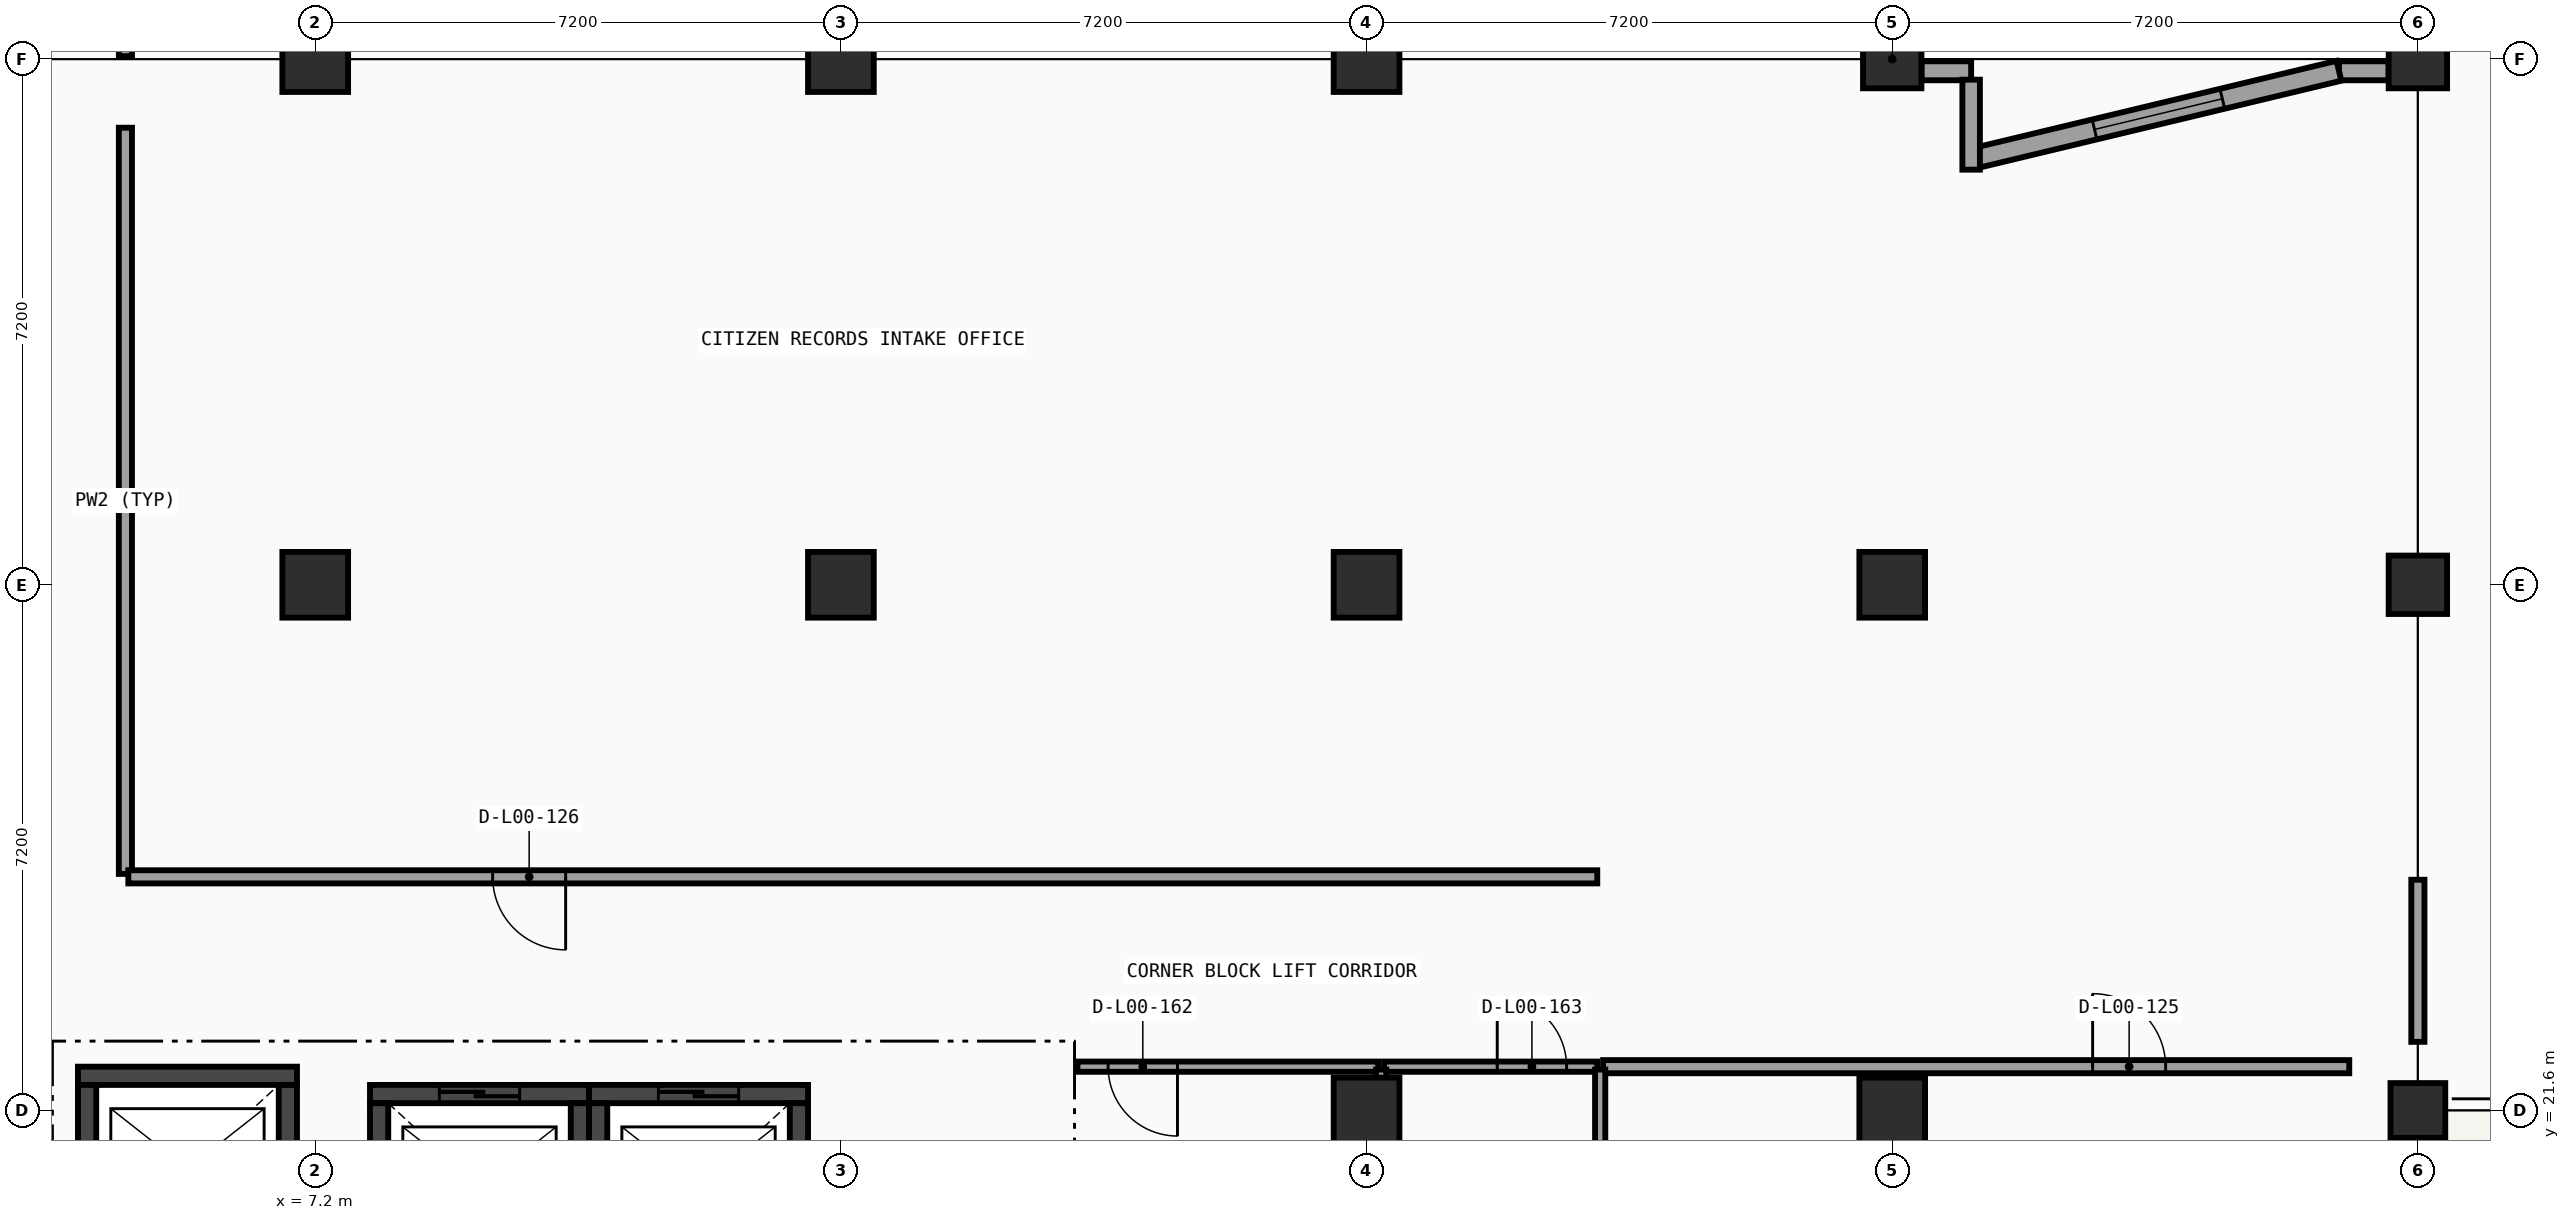
"""IFC4 building model, lengths in metres.
Left out: names, types, materials, properties, quantities, classifications, styles, units other than length and angle.
Written with IfcOpenShell. Run it as: python <this file> out.ifc"""

import sys

from ifc_helpers import new_model, si_unit, direction, frame, frame_2d, origin, origin_2d, place, context, subcontext, project, spatial, rectangle, extrude, element, fill, save


model = new_model("IFC4")
c1 = context("Model", 3, precision=1e-05, world=origin(), true_north=direction((0.0, 1.0)))
c2 = subcontext(c1, "Body", "Model", "MODEL_VIEW")
j1 = project(units=[si_unit("LENGTHUNIT", "METRE"), si_unit("PLANEANGLEUNIT", "RADIAN")], contexts=[c1])
p1 = place(None, origin())
s1 = spatial("IfcSite", under=j1, at=p1, CompositionType="ELEMENT")
p2 = place(p1, origin())
s2 = spatial("IfcBuilding", under=s1, at=p2, CompositionType="ELEMENT")
p3 = place(p2, origin())
s3 = spatial("IfcBuildingStorey", under=s2, at=p3, CompositionType="ELEMENT", Elevation=0.0)
for number, where, z_axis, x_axis in (
    (1, (7.2, 28.8, 0.0), (0.0, 0.0, 1.0), (1.0, 0.0, 0.0)),
    (2, (7.2, 36.0, 0.0), (0.0, 0.0, 1.0), (1.0, 0.0, 0.0)),
    (3, (14.4, 28.8, 0.0), (0.0, 0.0, 1.0), (1.0, 0.0, 0.0)),
    (4, (14.4, 36.0, 0.0), (0.0, 0.0, 1.0), (1.0, 0.0, 0.0)),
    (5, (21.6, 21.6, 0.0), (0.0, 0.0, 1.0), (1.0, 0.0, 0.0)),
    (6, (21.6, 28.8, 0.0), (0.0, 0.0, 1.0), (1.0, 0.0, 0.0)),
    (7, (21.6, 36.0, 0.0), (0.0, 0.0, 1.0), (1.0, 0.0, 0.0)),
    (8, (28.8, 21.6, 0.0), (0.0, 0.0, 1.0), (1.0, 0.0, 0.0)),
    (9, (28.8, 28.8, 0.0), (0.0, 0.0, 1.0), (1.0, 0.0, 0.0)),
):
    element("IfcColumn", number, at=place(p3, frame(where, z_axis=z_axis, x_axis=x_axis)), inside=s3, PredefinedType="COLUMN", context=c2, shape_type="SweptSolid", body=[
        extrude(rectangle(XDim=0.9, YDim=0.9, at=origin_2d()), origin(), (0.0, 0.0, 1.0), 5.4),
    ])
p4 = place(p3, frame((28.8, 36.0, 0.0), z_axis=(0.0, 0.0, 1.0), x_axis=(1.0, 0.0, 0.0)))
e10 = element("IfcColumn", 10, at=p4, inside=s3, PredefinedType="COLUMN", context=c2, shape_type="SweptSolid", body=[
    extrude(rectangle(XDim=0.8, YDim=0.8, at=origin_2d()), origin(), (0.0, 0.0, 1.0), 5.4),
])
p5 = place(p3, frame((36.0, 21.6, 0.0), z_axis=(0.0, 0.0, 1.0), x_axis=(1.0, 0.0, 0.0)))
e11 = element("IfcColumn", 11, at=p5, inside=s3, PredefinedType="COLUMN", context=c2, shape_type="SweptSolid", body=[
    extrude(rectangle(XDim=0.75, YDim=0.75, at=origin_2d()), origin(), (0.0, 0.0, 1.0), 5.4),
])
for number, where, z_axis, x_axis in (
    (12, (36.0, 28.8, 0.0), (0.0, 0.0, 1.0), (1.0, 0.0, 0.0)),
    (13, (36.0, 36.0, 0.0), (0.0, 0.0, 1.0), (1.0, 0.0, 0.0)),
):
    element("IfcColumn", number, at=place(p3, frame(where, z_axis=z_axis, x_axis=x_axis)), inside=s3, PredefinedType="COLUMN", context=c2, shape_type="SweptSolid", body=[
        extrude(rectangle(XDim=0.8, YDim=0.8, at=origin_2d()), origin(), (0.0, 0.0, 1.0), 5.4),
    ])
p6 = place(p3, frame((35.84, 21.224, 0.0), z_axis=(0.0, 0.0, 1.0), x_axis=(0.0, -1.0, 0.0)))
e14 = element("IfcWall", 14, at=p6, inside=s3, PredefinedType="SOLIDWALL", context=c2, shape_type="SweptSolid", body=[
    extrude(rectangle(XDim=0.68, YDim=0.26, at=frame_2d((0.34, 0.0))), origin(), (0.0, 0.0, 1.0), 4.461),
])
for number, where, z_axis, x_axis in (
    (15, (29.201, 35.84, 0.0), (0.0, 0.0, 1.0), (1.0, 0.0, 0.0)),
    (16, (34.919, 35.84, 0.0), (0.0, 0.0, 1.0), (1.0, 0.0, 0.0)),
):
    element("IfcWall", number, at=place(p3, frame(where, z_axis=z_axis, x_axis=x_axis)), inside=s3, PredefinedType="SOLIDWALL", context=c2, shape_type="SweptSolid", body=[
        extrude(rectangle(XDim=0.68, YDim=0.26, at=frame_2d((0.34, 0.0))), origin(), (0.0, 0.0, 1.0), 4.411),
    ])
p7 = place(p3, frame((29.973, 34.653, 0.0), z_axis=(0.0, 0.0, 1.0), x_axis=(0.972362024801, 0.233478248933, 0.0)))
e17 = element("IfcWall", 17, at=p7, inside=s3, PredefinedType="SOLIDWALL", context=c2, shape_type="SweptSolid", body=[
    extrude(rectangle(XDim=5.086, YDim=0.28, at=frame_2d((2.543, 0.0))), origin(), (0.0, 0.0, 1.0), 4.411),
])
p8 = place(p7, frame((1.643, 0.0, 0.8)))
e18 = element("IfcOpeningElement", 18, at=p8, cuts=e17, PredefinedType="OPENING", context=c2, shape_type="SweptSolid", body=[
    extrude(rectangle(XDim=1.8, YDim=1.85, at=frame_2d((0.9, 0.925))), frame((0.0, 0.15, 0.0), z_axis=(0.0, -1.0, 0.0), x_axis=(1.0, 0.0, 0.0)), (0.0, 0.0, 1.0), 0.3),
])
p9 = place(p3, frame((29.881, 34.486, 0.0), z_axis=(0.0, 0.0, 1.0), x_axis=(0.0, 1.0, 0.0)))
e19 = element("IfcWall", 19, at=p9, inside=s3, PredefinedType="SOLIDWALL", context=c2, shape_type="SweptSolid", body=[
    extrude(rectangle(XDim=1.232, YDim=0.24, at=frame_2d((0.616, 0.0))), origin(), (0.0, 0.0, 1.0), 5.12),
])
p10 = place(p3, frame((6.95, 22.075, 0.0), z_axis=(0.0, 0.0, 1.0), x_axis=(-1.0, 0.0, 0.0)))
e20 = element("IfcWall", 20, at=p10, inside=s3, PredefinedType="SHEAR", context=c2, shape_type="SweptSolid", body=[
    extrude(rectangle(XDim=3.0, YDim=0.25, at=frame_2d((1.5, 0.0))), origin(), (0.0, 0.0, 1.0), 5.12),
])
for number, where, z_axis, x_axis in (
    (21, (4.075, 21.95, 0.0), (0.0, 0.0, 1.0), (0.0, -1.0, 0.0)),
    (22, (6.825, 19.65, 0.0), (0.0, 0.0, 1.0), (0.0, 1.0, 0.0)),
):
    element("IfcWall", number, at=place(p3, frame(where, z_axis=z_axis, x_axis=x_axis)), inside=s3, PredefinedType="SHEAR", context=c2, shape_type="SweptSolid", body=[
        extrude(rectangle(XDim=2.3, YDim=0.25, at=frame_2d((1.15, 0.0))), origin(), (0.0, 0.0, 1.0), 5.12),
    ])
p11 = place(p3, frame((10.95, 21.825, 0.0), z_axis=(0.0, 0.0, 1.0), x_axis=(-1.0, 0.0, 0.0)))
e23 = element("IfcWall", 23, at=p11, inside=s3, PredefinedType="SHEAR", context=c2, shape_type="SweptSolid", body=[
    extrude(rectangle(XDim=3.0, YDim=0.25, at=frame_2d((1.5, 0.0))), origin(), (0.0, 0.0, 1.0), 5.12),
])
p12 = place(p11, frame((0.95, 0.0, 0.0)))
e24 = element("IfcOpeningElement", 24, at=p12, cuts=e23, PredefinedType="OPENING", context=c2, shape_type="SweptSolid", body=[
    extrude(rectangle(XDim=1.1, YDim=2.1, at=frame_2d((0.55, 1.05))), frame((0.0, 0.135, 0.0), z_axis=(0.0, -1.0, 0.0), x_axis=(1.0, 0.0, 0.0)), (0.0, 0.0, 1.0), 0.27),
])
for number, where, z_axis, x_axis in (
    (25, (8.075, 21.7, 0.0), (0.0, 0.0, 1.0), (0.0, -1.0, 0.0)),
    (26, (10.825, 19.4, 0.0), (0.0, 0.0, 1.0), (0.0, 1.0, 0.0)),
):
    element("IfcWall", number, at=place(p3, frame(where, z_axis=z_axis, x_axis=x_axis)), inside=s3, PredefinedType="SHEAR", context=c2, shape_type="SweptSolid", body=[
        extrude(rectangle(XDim=2.3, YDim=0.25, at=frame_2d((1.15, 0.0))), origin(), (0.0, 0.0, 1.0), 5.12),
    ])
p13 = place(p3, frame((13.95, 21.825, 0.0), z_axis=(0.0, 0.0, 1.0), x_axis=(-1.0, 0.0, 0.0)))
e27 = element("IfcWall", 27, at=p13, inside=s3, PredefinedType="SHEAR", context=c2, shape_type="SweptSolid", body=[
    extrude(rectangle(XDim=3.0, YDim=0.25, at=frame_2d((1.5, 0.0))), origin(), (0.0, 0.0, 1.0), 5.12),
])
p14 = place(p13, frame((0.95, 0.0, 0.0)))
e28 = element("IfcOpeningElement", 28, at=p14, cuts=e27, PredefinedType="OPENING", context=c2, shape_type="SweptSolid", body=[
    extrude(rectangle(XDim=1.1, YDim=2.1, at=frame_2d((0.55, 1.05))), frame((0.0, 0.135, 0.0), z_axis=(0.0, -1.0, 0.0), x_axis=(1.0, 0.0, 0.0)), (0.0, 0.0, 1.0), 0.27),
])
for number, where, z_axis, x_axis in (
    (29, (11.075, 21.7, 0.0), (0.0, 0.0, 1.0), (0.0, -1.0, 0.0)),
    (30, (13.825, 19.4, 0.0), (0.0, 0.0, 1.0), (0.0, 1.0, 0.0)),
):
    element("IfcWall", number, at=place(p3, frame(where, z_axis=z_axis, x_axis=x_axis)), inside=s3, PredefinedType="SHEAR", context=c2, shape_type="SweptSolid", body=[
        extrude(rectangle(XDim=2.3, YDim=0.25, at=frame_2d((1.15, 0.0))), origin(), (0.0, 0.0, 1.0), 5.12),
    ])
p15 = place(p3, frame((4.6, 24.84, 0.0), z_axis=(0.0, 0.0, 1.0), x_axis=(0.0, 1.0, 0.0)))
e31 = element("IfcWall", 31, at=p15, inside=s3, PredefinedType="PARTITIONING", context=c2, shape_type="SweptSolid", body=[
    extrude(rectangle(XDim=10.22, YDim=0.18, at=frame_2d((5.11, 0.0))), origin(), (0.0, 0.0, 1.0), 4.45),
])
p16 = place(p3, frame((4.6, 36.04, 0.0), z_axis=(0.0, 0.0, 1.0), x_axis=(0.0, 1.0, 0.0)))
e32 = element("IfcWall", 32, at=p16, inside=s3, PredefinedType="PARTITIONING", context=c2, shape_type="SweptSolid", body=[
    extrude(rectangle(XDim=14.32, YDim=0.18, at=frame_2d((7.16, 0.0))), origin(), (0.0, 0.0, 1.0), 4.45),
])
p17 = place(p16, frame((3.54, 0.0, 0.0)))
e33 = element("IfcOpeningElement", 33, at=p17, cuts=e32, PredefinedType="OPENING", context=c2, shape_type="SweptSolid", body=[
    extrude(rectangle(XDim=1.0, YDim=2.1, at=frame_2d((0.5, 1.05))), frame((0.0, 0.1, 0.0), z_axis=(0.0, -1.0, 0.0), x_axis=(1.0, 0.0, 0.0)), (0.0, 0.0, 1.0), 0.2),
])
p18 = place(p3, frame((24.84, 22.2, 0.0), z_axis=(0.0, 0.0, 1.0), x_axis=(1.0, 0.0, 0.0)))
e34 = element("IfcWall", 34, at=p18, inside=s3, PredefinedType="PARTITIONING", context=c2, shape_type="SweptSolid", body=[
    extrude(rectangle(XDim=10.22, YDim=0.18, at=frame_2d((5.11, 0.0))), origin(), (0.0, 0.0, 1.0), 4.311),
])
p19 = place(p18, frame((6.705, 0.0, 0.0)))
e35 = element("IfcOpeningElement", 35, at=p19, cuts=e34, PredefinedType="OPENING", context=c2, shape_type="SweptSolid", body=[
    extrude(rectangle(XDim=1.0, YDim=2.1, at=frame_2d((0.5, 1.05))), frame((0.0, 0.1, 0.0), z_axis=(0.0, -1.0, 0.0), x_axis=(1.0, 0.0, 0.0)), (0.0, 0.0, 1.0), 0.2),
])
p20 = place(p3, frame((4.64, 24.8, 0.0), z_axis=(0.0, 0.0, 1.0), x_axis=(1.0, 0.0, 0.0)))
e36 = element("IfcWall", 36, at=p20, inside=s3, PredefinedType="PARTITIONING", context=c2, shape_type="SweptSolid", body=[
    extrude(rectangle(XDim=20.12, YDim=0.18, at=frame_2d((10.06, 0.0))), origin(), (0.0, 0.0, 1.0), 4.311),
])
p21 = place(p20, frame((4.99, 0.0, 0.0)))
e37 = element("IfcOpeningElement", 37, at=p21, cuts=e36, PredefinedType="OPENING", context=c2, shape_type="SweptSolid", body=[
    extrude(rectangle(XDim=1.0, YDim=2.1, at=frame_2d((0.5, 1.05))), frame((0.0, 0.1, 0.0), z_axis=(0.0, -1.0, 0.0), x_axis=(1.0, 0.0, 0.0)), (0.0, 0.0, 1.0), 0.2),
])
p22 = place(p3, frame((36.0, 22.54, 0.0), z_axis=(0.0, 0.0, 1.0), x_axis=(0.0, 1.0, 0.0)))
e38 = element("IfcWall", 38, at=p22, inside=s3, PredefinedType="PARTITIONING", context=c2, shape_type="SweptSolid", body=[
    extrude(rectangle(XDim=2.22, YDim=0.18, at=frame_2d((1.11, 0.0))), origin(), (0.0, 0.0, 1.0), 4.461),
])
p23 = place(p3, frame((17.64, 22.2, 0.0), z_axis=(0.0, 0.0, 1.0), x_axis=(1.0, 0.0, 0.0)))
e39 = element("IfcWall", 39, at=p23, inside=s3, PredefinedType="PARTITIONING", context=c2, shape_type="SweptSolid", body=[
    extrude(rectangle(XDim=4.12, YDim=0.14, at=frame_2d((2.06, 0.0))), origin(), (0.0, 0.0, 1.0), 4.311),
])
p24 = place(p23, frame((0.42, 0.0, 0.0)))
e40 = element("IfcOpeningElement", 40, at=p24, cuts=e39, PredefinedType="OPENING", context=c2, shape_type="SweptSolid", body=[
    extrude(rectangle(XDim=0.95, YDim=2.08, at=frame_2d((0.475, 1.04))), frame((0.0, 0.08, 0.0), z_axis=(0.0, -1.0, 0.0), x_axis=(1.0, 0.0, 0.0)), (0.0, 0.0, 1.0), 0.16),
])
p25 = place(p3, frame((21.84, 22.2, 0.0), z_axis=(0.0, 0.0, 1.0), x_axis=(1.0, 0.0, 0.0)))
e41 = element("IfcWall", 41, at=p25, inside=s3, PredefinedType="PARTITIONING", context=c2, shape_type="SweptSolid", body=[
    extrude(rectangle(XDim=2.92, YDim=0.14, at=frame_2d((1.46, 0.0))), origin(), (0.0, 0.0, 1.0), 4.311),
])
p26 = place(p25, frame((1.55, 0.0, 0.0)))
e42 = element("IfcOpeningElement", 42, at=p26, cuts=e41, PredefinedType="OPENING", context=c2, shape_type="SweptSolid", body=[
    extrude(rectangle(XDim=0.95, YDim=2.08, at=frame_2d((0.475, 1.04))), frame((0.0, 0.08, 0.0), z_axis=(0.0, -1.0, 0.0), x_axis=(1.0, 0.0, 0.0)), (0.0, 0.0, 1.0), 0.16),
])
p27 = place(p3, frame((24.8, 15.04, 0.0), z_axis=(0.0, 0.0, 1.0), x_axis=(0.0, 1.0, 0.0)))
e43 = element("IfcWall", 43, at=p27, inside=s3, PredefinedType="PARTITIONING", context=c2, shape_type="SweptSolid", body=[
    extrude(rectangle(XDim=7.12, YDim=0.14, at=frame_2d((3.56, 0.0))), origin(), (0.0, 0.0, 1.0), 4.45),
])
p28 = place(p3, frame((21.8, 18.44, 0.0), z_axis=(0.0, 0.0, 1.0), x_axis=(0.0, 1.0, 0.0)))
e44 = element("IfcWall", 44, at=p28, inside=s3, PredefinedType="PARTITIONING", context=c2, shape_type="SweptSolid", body=[
    extrude(rectangle(XDim=3.72, YDim=0.14, at=frame_2d((1.86, 0.0))), origin(), (0.0, 0.0, 1.0), 4.311),
])
p29 = place(p8, origin())
e45 = element("IfcWindow", 45, at=p29, inside=s3, PartitioningType="SINGLE_PANEL", PredefinedType="WINDOW", context=c2, shape_type="SweptSolid", body=[
    extrude(rectangle(XDim=1.8, YDim=1.85, at=frame_2d((0.9, 0.925))), frame((0.0, 0.03, 0.0), z_axis=(0.0, -1.0, 0.0), x_axis=(1.0, 0.0, 0.0)), (0.0, 0.0, 1.0), 0.06),
])
fill(e18, e45)
p30 = place(p12, origin())
e46 = element("IfcDoor", 46, at=p30, inside=s3, OperationType="SLIDING_TO_LEFT", PredefinedType="DOOR", context=c2, shape_type="SweptSolid", body=[
    extrude(rectangle(XDim=1.1, YDim=2.1, at=frame_2d((0.55, 1.05))), frame((0.0, 0.025, 0.0), z_axis=(0.0, -1.0, 0.0), x_axis=(1.0, 0.0, 0.0)), (0.0, 0.0, 1.0), 0.05),
])
fill(e24, e46)
p31 = place(p14, origin())
e47 = element("IfcDoor", 47, at=p31, inside=s3, OperationType="SLIDING_TO_LEFT", PredefinedType="DOOR", context=c2, shape_type="SweptSolid", body=[
    extrude(rectangle(XDim=1.1, YDim=2.1, at=frame_2d((0.55, 1.05))), frame((0.0, 0.025, 0.0), z_axis=(0.0, -1.0, 0.0), x_axis=(1.0, 0.0, 0.0)), (0.0, 0.0, 1.0), 0.05),
])
fill(e28, e47)
p32 = place(p19, origin())
e48 = element("IfcDoor", 48, at=p32, inside=s3, OperationType="SINGLE_SWING_LEFT", PredefinedType="DOOR", context=c2, shape_type="SweptSolid", body=[
    extrude(rectangle(XDim=1.0, YDim=2.1, at=frame_2d((0.5, 1.05))), frame((0.0, 0.025, 0.0), z_axis=(0.0, -1.0, 0.0), x_axis=(1.0, 0.0, 0.0)), (0.0, 0.0, 1.0), 0.05),
])
fill(e35, e48)
p33 = place(p21, origin())
e49 = element("IfcDoor", 49, at=p33, inside=s3, OperationType="SINGLE_SWING_RIGHT", PredefinedType="DOOR", context=c2, shape_type="SweptSolid", body=[
    extrude(rectangle(XDim=1.0, YDim=2.1, at=frame_2d((0.5, 1.05))), frame((0.0, 0.025, 0.0), z_axis=(0.0, -1.0, 0.0), x_axis=(1.0, 0.0, 0.0)), (0.0, 0.0, 1.0), 0.05),
])
fill(e37, e49)
p34 = place(p24, origin())
e50 = element("IfcDoor", 50, at=p34, inside=s3, OperationType="SINGLE_SWING_RIGHT", PredefinedType="DOOR", context=c2, shape_type="SweptSolid", body=[
    extrude(rectangle(XDim=0.95, YDim=2.08, at=frame_2d((0.475, 1.04))), frame((0.0, 0.025, 0.0), z_axis=(0.0, -1.0, 0.0), x_axis=(1.0, 0.0, 0.0)), (0.0, 0.0, 1.0), 0.05),
])
fill(e40, e50)
p35 = place(p26, origin())
e51 = element("IfcDoor", 51, at=p35, inside=s3, OperationType="SINGLE_SWING_LEFT", PredefinedType="DOOR", context=c2, shape_type="SweptSolid", body=[
    extrude(rectangle(XDim=0.95, YDim=2.08, at=frame_2d((0.475, 1.04))), frame((0.0, 0.025, 0.0), z_axis=(0.0, -1.0, 0.0), x_axis=(1.0, 0.0, 0.0)), (0.0, 0.0, 1.0), 0.05),
])
fill(e42, e51)
save(model, sys.argv[1])
